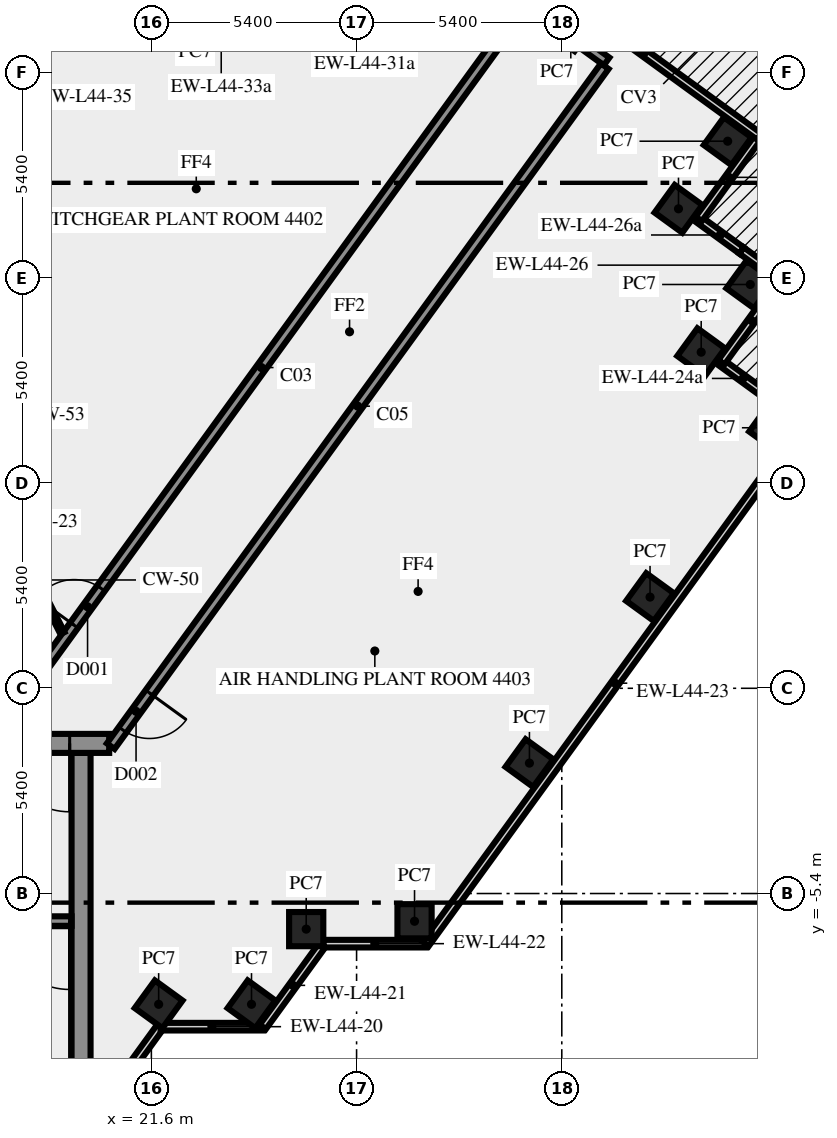
"""IFC4 building model, lengths in metres.
Left out: names, types, materials, properties, quantities, classifications, styles, units other than length and angle.
Written with IfcOpenShell. Run it as: python <this file> out.ifc"""

import sys

from ifc_helpers import new_model, si_unit, direction, frame, frame_2d, origin, origin_2d, place, context, subcontext, project, spatial, rectangle, extrude, element, fill, save


model = new_model("IFC4")
c1 = context("Model", 3, precision=1e-05, world=origin(), true_north=direction((0.0, 1.0)))
c2 = subcontext(c1, "Body", "Model", "MODEL_VIEW")
j1 = project(units=[si_unit("LENGTHUNIT", "METRE"), si_unit("PLANEANGLEUNIT", "RADIAN")], contexts=[c1])
p1 = place(None, origin())
s1 = spatial("IfcSite", under=j1, at=p1, CompositionType="ELEMENT")
p2 = place(p1, origin())
s2 = spatial("IfcBuilding", under=s1, at=p2, CompositionType="ELEMENT")
p3 = place(p2, frame((0.0, 0.0, 188.0)))
s3 = spatial("IfcBuildingStorey", under=s2, at=p3, CompositionType="ELEMENT", Elevation=188.0)
for number, where, z_axis, x_axis in (
    (1, (21.792, -8.315, 0.0), (0.0, 0.0, 1.0), (0.588, 0.809, 0.0)),
    (2, (24.235, -8.315, 0.0), (0.0, 0.0, 1.0), (0.588, 0.809, 0.0)),
    (3, (25.674, -6.337, 0.0), (0.0, 0.0, 1.0), (1.0, 0.0, 0.0)),
    (4, (28.525, -6.13, 0.0), (0.0, 0.0, 1.0), (1.0, 0.0, 0.0)),
    (5, (31.548, -1.969, 0.0), (0.0, 0.0, 1.0), (0.588, 0.809, 0.0)),
    (6, (34.722, 2.4, 0.0), (0.0, 0.0, 1.0), (0.588, 0.809, 0.0)),
    (7, (37.96, 6.855, 0.0), (0.0, 0.0, 1.0), (0.588, 0.809, 0.0)),
    (8, (36.068, 8.844, 0.0), (0.0, 0.0, 1.0), (0.588, 0.809, 0.0)),
    (9, (37.36, 10.625, 0.0), (0.0, 0.0, 1.0), (0.588, 0.809, 0.0)),
    (10, (35.471, 12.616, 0.0), (0.0, 0.0, 1.0), (-0.809, 0.588, 0.0)),
    (11, (36.765, 14.395, 0.0), (0.0, 0.0, 1.0), (-0.809, 0.588, 0.0)),
):
    element("IfcColumn", number, at=place(p3, frame(where, z_axis=z_axis, x_axis=x_axis)), inside=s3, PredefinedType="COLUMN", context=c2, shape_type="SweptSolid", body=[
        extrude(rectangle(XDim=0.9, YDim=0.9, at=origin_2d()), origin(), (0.0, 0.0, 1.0), 5.65),
    ])
p4 = place(p3, frame((20.253, -11.083, 0.0), z_axis=(0.0, 0.0, 1.0), x_axis=(0.587766567315, 0.809030569476, 0.0)))
e12 = element("IfcWall", 12, at=p4, inside=s3, PredefinedType="SOLIDWALL", context=c2, shape_type="SweptSolid", body=[
    extrude(rectangle(XDim=2.688, YDim=0.2, at=frame_2d((1.344, 0.0))), origin(), (0.0, 0.0, 1.0), 5.65),
])
p5 = place(p3, frame((21.843, -8.904, 0.0), z_axis=(0.0, 0.0, 1.0), x_axis=(1.0, 0.0, 0.0)))
e13 = element("IfcWall", 13, at=p5, inside=s3, PredefinedType="SOLIDWALL", context=c2, shape_type="SweptSolid", body=[
    extrude(rectangle(XDim=2.7, YDim=0.2, at=frame_2d((1.35, 0.0))), origin(), (0.0, 0.0, 1.0), 5.65),
])
p6 = place(p3, frame((24.533, -8.909, 0.0), z_axis=(0.0, 0.0, 1.0), x_axis=(0.587720002413, 0.809064397168, 0.0)))
e14 = element("IfcWall", 14, at=p6, inside=s3, PredefinedType="SOLIDWALL", context=c2, shape_type="SweptSolid", body=[
    extrude(rectangle(XDim=2.7, YDim=0.2, at=frame_2d((1.35, 0.0))), origin(), (0.0, 0.0, 1.0), 5.65),
])
p7 = place(p3, frame((26.13, -6.719, 0.0), z_axis=(0.0, 0.0, 1.0), x_axis=(1.0, 0.0, 0.0)))
e15 = element("IfcWall", 15, at=p7, inside=s3, PredefinedType="SOLIDWALL", context=c2, shape_type="SweptSolid", body=[
    extrude(rectangle(XDim=2.7, YDim=0.2, at=frame_2d((1.35, 0.0))), origin(), (0.0, 0.0, 1.0), 5.65),
])
p8 = place(p3, frame((28.82, -6.724, 0.0), z_axis=(0.0, 0.0, 1.0), x_axis=(0.587789790223, 0.809013697356, 0.0)))
e16 = element("IfcWall", 16, at=p8, inside=s3, PredefinedType="SOLIDWALL", context=c2, shape_type="SweptSolid", body=[
    extrude(rectangle(XDim=16.956, YDim=0.2, at=frame_2d((8.478, 0.0))), origin(), (0.0, 0.0, 1.0), 5.65),
])
p9 = place(p3, frame((37.735, 7.742, 0.0), z_axis=(0.0, 0.0, 1.0), x_axis=(-0.808970345434, 0.587849453694, 0.0)))
e17 = element("IfcWall", 17, at=p9, inside=s3, PredefinedType="SOLIDWALL", context=c2, shape_type="SweptSolid", body=[
    extrude(rectangle(XDim=1.397, YDim=0.2, at=frame_2d((0.698, 0.0))), origin(), (0.0, 0.0, 1.0), 4.15),
])
p10 = place(p3, frame((36.602, 8.58, 0.0), z_axis=(0.0, 0.0, 1.0), x_axis=(0.587822180636, 0.808990163075, 0.0)))
e18 = element("IfcWall", 18, at=p10, inside=s3, PredefinedType="SOLIDWALL", context=c2, shape_type="SweptSolid", body=[
    extrude(rectangle(XDim=2.7, YDim=0.2, at=frame_2d((1.35, 0.0))), origin(), (0.0, 0.0, 1.0), 5.65),
])
p11 = place(p3, frame((38.192, 10.748, 0.0), z_axis=(0.0, 0.0, 1.0), x_axis=(-0.808985145084, 0.587829086584, 0.0)))
e19 = element("IfcWall", 19, at=p11, inside=s3, PredefinedType="SOLIDWALL", context=c2, shape_type="SweptSolid", body=[
    extrude(rectangle(XDim=1.314, YDim=0.2, at=frame_2d((0.657, 0.0))), origin(), (0.0, 0.0, 1.0), 5.65),
])
p12 = place(p3, frame((37.129, 11.52, 0.0), z_axis=(0.0, 0.0, 1.0), x_axis=(-0.809078659976, 0.58770036751, 0.0)))
e20 = element("IfcWall", 20, at=p12, inside=s3, PredefinedType="SOLIDWALL", context=c2, shape_type="SweptSolid", body=[
    extrude(rectangle(XDim=1.386, YDim=0.2, at=frame_2d((0.693, 0.0))), origin(), (0.0, 0.0, 1.0), 4.15),
])
p13 = place(p3, frame((36.005, 12.352, 0.0), z_axis=(0.0, 0.0, 1.0), x_axis=(0.587762999008, 0.809033161865, 0.0)))
e21 = element("IfcWall", 21, at=p13, inside=s3, PredefinedType="SOLIDWALL", context=c2, shape_type="SweptSolid", body=[
    extrude(rectangle(XDim=2.7, YDim=0.2, at=frame_2d((1.35, 0.0))), origin(), (0.0, 0.0, 1.0), 5.65),
])
p14 = place(p3, frame((37.594, 14.519, 0.0), z_axis=(0.0, 0.0, 1.0), x_axis=(-0.809028102457, 0.587769963025, 0.0)))
e22 = element("IfcWall", 22, at=p14, inside=s3, PredefinedType="SOLIDWALL", context=c2, shape_type="SweptSolid", body=[
    extrude(rectangle(XDim=7.481, YDim=0.2, at=frame_2d((3.741, 0.0))), origin(), (0.0, 0.0, 1.0), 5.65),
])
p15 = place(p3, frame((20.846, 20.028, 0.0), z_axis=(0.0, 0.0, 1.0), x_axis=(-0.58779571445, -0.809009393069, 0.0)))
e23 = element("IfcWall", 23, at=p15, inside=s3, PredefinedType="SOLIDWALL", context=c2, shape_type="SweptSolid", body=[
    extrude(rectangle(XDim=11.044, YDim=0.2, at=frame_2d((5.522, 0.0))), origin(), (0.0, 0.0, 1.0), 5.65),
])
p16 = place(p3, frame((19.75, -10.5, 0.0), z_axis=(0.0, 0.0, 1.0), x_axis=(0.0, 1.0, 0.0)))
e24 = element("IfcWall", 24, at=p16, inside=s3, PredefinedType="SHEAR", context=c2, shape_type="SweptSolid", body=[
    extrude(rectangle(XDim=8.8, YDim=0.5, at=frame_2d((4.4, 0.0))), origin(), (0.0, 0.0, 1.0), 5.65),
])
p17 = place(p3, frame((19.5, -6.125, 0.0), z_axis=(0.0, 0.0, 1.0), x_axis=(-1.0, 0.0, 0.0)))
e25 = element("IfcWall", 25, at=p17, inside=s3, PredefinedType="SHEAR", context=c2, shape_type="SweptSolid", body=[
    extrude(rectangle(XDim=8.05, YDim=0.25, at=frame_2d((4.025, 0.0))), origin(), (0.0, 0.0, 1.0), 5.65),
])
p18 = place(p17, frame((0.05, 0.0, 0.0)))
e26 = element("IfcOpeningElement", 26, at=p18, cuts=e25, PredefinedType="OPENING", context=c2, shape_type="SweptSolid", body=[
    extrude(rectangle(XDim=1.8, YDim=2.1, at=frame_2d((0.9, 1.05))), frame((0.0, 0.135, 0.0), z_axis=(0.0, -1.0, 0.0), x_axis=(1.0, 0.0, 0.0)), (0.0, 0.0, 1.0), 0.27),
])
p19 = place(p3, frame((20.49, -1.45, 0.0), z_axis=(0.0, 0.0, 1.0), x_axis=(-1.0, 0.0, 0.0)))
e27 = element("IfcWall", 27, at=p19, inside=s3, PredefinedType="SHEAR", context=c2, shape_type="SweptSolid", body=[
    extrude(rectangle(XDim=40.98, YDim=0.5, at=frame_2d((20.49, 0.0))), origin(), (0.0, 0.0, 1.0), 5.65),
])
p20 = place(p19, frame((38.14, 0.0, 0.0)))
e28 = element("IfcOpeningElement", 28, at=p20, cuts=e27, PredefinedType="OPENING", context=c2, shape_type="SweptSolid", body=[
    extrude(rectangle(XDim=1.8, YDim=2.1, at=frame_2d((0.9, 1.05))), frame((0.0, 0.26, 0.0), z_axis=(0.0, -1.0, 0.0), x_axis=(1.0, 0.0, 0.0)), (0.0, 0.0, 1.0), 0.52),
])
p21 = place(p19, frame((36.728, 0.0, 0.0)))
e29 = element("IfcOpeningElement", 29, at=p21, cuts=e27, PredefinedType="OPENING", context=c2, shape_type="SweptSolid", body=[
    extrude(rectangle(XDim=0.8, YDim=2.1, at=frame_2d((0.4, 1.05))), frame((0.0, 0.26, 0.0), z_axis=(0.0, -1.0, 0.0), x_axis=(1.0, 0.0, 0.0)), (0.0, 0.0, 1.0), 0.52),
])
p22 = place(p19, frame((35.153, 0.0, 0.0)))
e30 = element("IfcOpeningElement", 30, at=p22, cuts=e27, PredefinedType="OPENING", context=c2, shape_type="SweptSolid", body=[
    extrude(rectangle(XDim=0.8, YDim=2.1, at=frame_2d((0.4, 1.05))), frame((0.0, 0.26, 0.0), z_axis=(0.0, -1.0, 0.0), x_axis=(1.0, 0.0, 0.0)), (0.0, 0.0, 1.0), 0.52),
])
p23 = place(p19, frame((32.94, 0.0, 0.0)))
e31 = element("IfcOpeningElement", 31, at=p23, cuts=e27, PredefinedType="OPENING", context=c2, shape_type="SweptSolid", body=[
    extrude(rectangle(XDim=0.9, YDim=2.1, at=frame_2d((0.45, 1.05))), frame((0.0, 0.26, 0.0), z_axis=(0.0, -1.0, 0.0), x_axis=(1.0, 0.0, 0.0)), (0.0, 0.0, 1.0), 0.52),
])
p24 = place(p19, frame((30.502, 0.0, 0.0)))
e32 = element("IfcOpeningElement", 32, at=p24, cuts=e27, PredefinedType="OPENING", context=c2, shape_type="SweptSolid", body=[
    extrude(rectangle(XDim=0.9, YDim=2.1, at=frame_2d((0.45, 1.05))), frame((0.0, 0.26, 0.0), z_axis=(0.0, -1.0, 0.0), x_axis=(1.0, 0.0, 0.0)), (0.0, 0.0, 1.0), 0.52),
])
p25 = place(p19, frame((28.14, 0.0, 0.0)))
e33 = element("IfcOpeningElement", 33, at=p25, cuts=e27, PredefinedType="OPENING", context=c2, shape_type="SweptSolid", body=[
    extrude(rectangle(XDim=0.9, YDim=2.1, at=frame_2d((0.45, 1.05))), frame((0.0, 0.26, 0.0), z_axis=(0.0, -1.0, 0.0), x_axis=(1.0, 0.0, 0.0)), (0.0, 0.0, 1.0), 0.52),
])
p26 = place(p19, frame((25.478, 0.0, 0.0)))
e34 = element("IfcOpeningElement", 34, at=p26, cuts=e27, PredefinedType="OPENING", context=c2, shape_type="SweptSolid", body=[
    extrude(rectangle(XDim=0.9, YDim=2.1, at=frame_2d((0.45, 1.05))), frame((0.0, 0.26, 0.0), z_axis=(0.0, -1.0, 0.0), x_axis=(1.0, 0.0, 0.0)), (0.0, 0.0, 1.0), 0.52),
])
p27 = place(p19, frame((21.765, 0.0, 0.0)))
e35 = element("IfcOpeningElement", 35, at=p27, cuts=e27, PredefinedType="OPENING", context=c2, shape_type="SweptSolid", body=[
    extrude(rectangle(XDim=2.0, YDim=2.1, at=frame_2d((1.0, 1.05))), frame((0.0, 0.26, 0.0), z_axis=(0.0, -1.0, 0.0), x_axis=(1.0, 0.0, 0.0)), (0.0, 0.0, 1.0), 0.52),
])
p28 = place(p19, frame((7.14, 0.0, 0.0)))
e36 = element("IfcOpeningElement", 36, at=p28, cuts=e27, PredefinedType="OPENING", context=c2, shape_type="SweptSolid", body=[
    extrude(rectangle(XDim=0.9, YDim=2.1, at=frame_2d((0.45, 1.05))), frame((0.0, 0.26, 0.0), z_axis=(0.0, -1.0, 0.0), x_axis=(1.0, 0.0, 0.0)), (0.0, 0.0, 1.0), 0.52),
])
p29 = place(p19, frame((4.19, 0.0, 0.0)))
e37 = element("IfcOpeningElement", 37, at=p29, cuts=e27, PredefinedType="OPENING", context=c2, shape_type="SweptSolid", body=[
    extrude(rectangle(XDim=0.9, YDim=2.1, at=frame_2d((0.45, 1.05))), frame((0.0, 0.26, 0.0), z_axis=(0.0, -1.0, 0.0), x_axis=(1.0, 0.0, 0.0)), (0.0, 0.0, 1.0), 0.52),
])
p30 = place(p19, frame((1.04, 0.0, 0.0)))
e38 = element("IfcOpeningElement", 38, at=p30, cuts=e27, PredefinedType="OPENING", context=c2, shape_type="SweptSolid", body=[
    extrude(rectangle(XDim=1.8, YDim=2.1, at=frame_2d((0.9, 1.05))), frame((0.0, 0.26, 0.0), z_axis=(0.0, -1.0, 0.0), x_axis=(1.0, 0.0, 0.0)), (0.0, 0.0, 1.0), 0.52),
])
p31 = place(p3, frame((17.545, -1.125, 0.0), z_axis=(0.0, 0.0, 1.0), x_axis=(0.587789755823, 0.80901372235, 0.0)))
e39 = element("IfcWall", 39, at=p31, inside=s3, PredefinedType="SOLIDWALL", context=c2, shape_type="SweptSolid", body=[
    extrude(rectangle(XDim=23.645, YDim=0.25, at=frame_2d((11.822, 0.0))), origin(), (0.0, 0.0, 1.0), 5.65),
])
p32 = place(p31, frame((3.442, 0.0, 0.0)))
e40 = element("IfcOpeningElement", 40, at=p32, cuts=e39, PredefinedType="OPENING", context=c2, shape_type="SweptSolid", body=[
    extrude(rectangle(XDim=1.2, YDim=2.1, at=frame_2d((0.6, 1.05))), frame((0.0, 0.135, 0.0), z_axis=(0.0, -1.0, 0.0), x_axis=(1.0, 0.0, 0.0)), (0.0, 0.0, 1.0), 0.27),
])
p33 = place(p3, frame((31.567, 17.956, 0.0), z_axis=(0.0, 0.0, 1.0), x_axis=(0.809011863271, -0.587792314586, 0.0)))
e41 = element("IfcWall", 41, at=p33, inside=s3, PredefinedType="SOLIDWALL", context=c2, shape_type="SweptSolid", body=[
    extrude(rectangle(XDim=2.488, YDim=0.25, at=frame_2d((1.244, 0.0))), origin(), (0.0, 0.0, 1.0), 5.65),
])
p34 = place(p3, frame((33.531, 16.369, 0.0), z_axis=(0.0, 0.0, 1.0), x_axis=(-0.587781095509, -0.809020014438, 0.0)))
e42 = element("IfcWall", 42, at=p34, inside=s3, PredefinedType="SOLIDWALL", context=c2, shape_type="SweptSolid", body=[
    extrude(rectangle(XDim=22.117, YDim=0.25, at=frame_2d((11.058, 0.0))), origin(), (0.0, 0.0, 1.0), 5.65),
])
p35 = place(p34, frame((20.384, 0.0, 0.0)))
e43 = element("IfcOpeningElement", 43, at=p35, cuts=e42, PredefinedType="OPENING", context=c2, shape_type="SweptSolid", body=[
    extrude(rectangle(XDim=1.2, YDim=2.1, at=frame_2d((0.6, 1.05))), frame((0.0, 0.135, 0.0), z_axis=(0.0, -1.0, 0.0), x_axis=(1.0, 0.0, 0.0)), (0.0, 0.0, 1.0), 0.27),
])
p36 = place(p3, frame((18.0, 3.925, 0.0), z_axis=(0.0, 0.0, 1.0), x_axis=(0.453950796792, -0.891026752736, 0.0)))
e44 = element("IfcWall", 44, at=p36, inside=s3, PredefinedType="PARTITIONING", context=c2, shape_type="SweptSolid", body=[
    extrude(rectangle(XDim=2.778, YDim=0.12, at=frame_2d((1.389, 0.0))), origin(), (0.0, 0.0, 1.0), 5.65),
])
p37 = place(p18, origin())
e45 = element("IfcDoor", 45, at=p37, inside=s3, OperationType="DOUBLE_DOOR_SINGLE_SWING", PredefinedType="DOOR", context=c2, shape_type="SweptSolid", body=[
    extrude(rectangle(XDim=1.8, YDim=2.1, at=frame_2d((0.9, 1.05))), frame((0.0, 0.025, 0.0), z_axis=(0.0, -1.0, 0.0), x_axis=(1.0, 0.0, 0.0)), (0.0, 0.0, 1.0), 0.05),
])
fill(e26, e45)
p38 = place(p30, origin())
e46 = element("IfcDoor", 46, at=p38, inside=s3, OperationType="DOUBLE_DOOR_SINGLE_SWING", PredefinedType="DOOR", context=c2, shape_type="SweptSolid", body=[
    extrude(rectangle(XDim=1.8, YDim=2.1, at=frame_2d((0.9, 1.05))), frame((0.0, 0.025, 0.0), z_axis=(0.0, -1.0, 0.0), x_axis=(1.0, 0.0, 0.0)), (0.0, 0.0, 1.0), 0.05),
])
fill(e38, e46)
p39 = place(p35, origin())
e47 = element("IfcDoor", 47, at=p39, inside=s3, OperationType="SINGLE_SWING_RIGHT", PredefinedType="DOOR", context=c2, shape_type="SweptSolid", body=[
    extrude(rectangle(XDim=1.2, YDim=2.1, at=frame_2d((0.6, 1.05))), frame((0.0, 0.025, 0.0), z_axis=(0.0, -1.0, 0.0), x_axis=(1.0, 0.0, 0.0)), (0.0, 0.0, 1.0), 0.05),
])
fill(e43, e47)
p40 = place(p32, origin())
e48 = element("IfcDoor", 48, at=p40, inside=s3, OperationType="SINGLE_SWING_LEFT", PredefinedType="DOOR", context=c2, shape_type="SweptSolid", body=[
    extrude(rectangle(XDim=1.2, YDim=2.1, at=frame_2d((0.6, 1.05))), frame((0.0, 0.025, 0.0), z_axis=(0.0, -1.0, 0.0), x_axis=(1.0, 0.0, 0.0)), (0.0, 0.0, 1.0), 0.05),
])
fill(e40, e48)
save(model, sys.argv[1])
